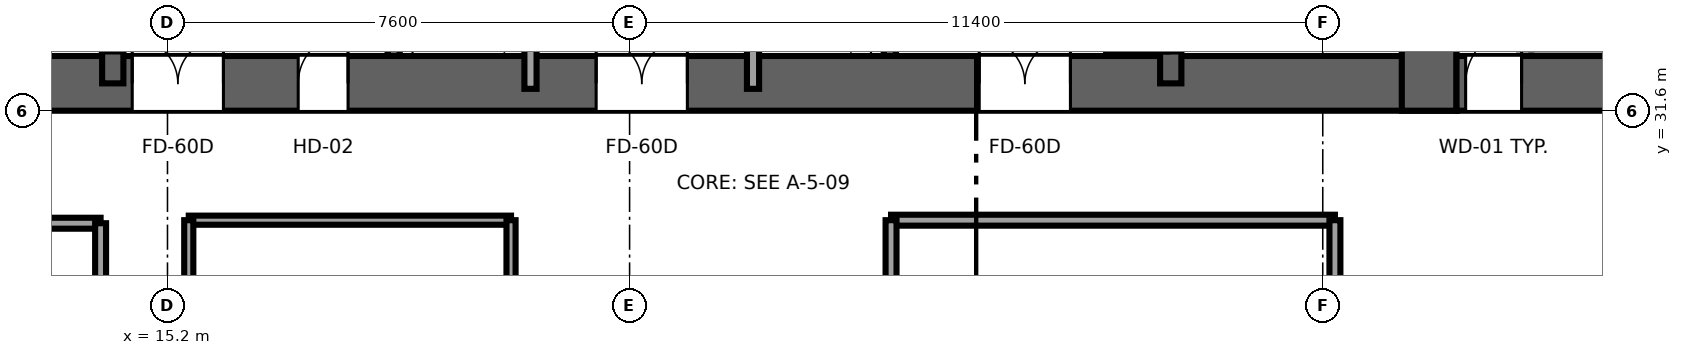
"""IFC4 building model, lengths in metres.
Left out: names, types, materials, properties, quantities, classifications, styles, units other than length and angle.
Written with IfcOpenShell. Run it as: python <this file> out.ifc"""

import sys

from ifc_helpers import new_model, si_unit, direction, frame, frame_2d, origin, place, context, subcontext, project, spatial, rectangle, extrude, source, transform, mapped, element, fill, save


model = new_model("IFC4")
c1 = context("Model", 3, precision=1e-05, world=origin(), true_north=direction((0.0, 1.0)))
c2 = subcontext(c1, "Body", "Model", "MODEL_VIEW")
j1 = project(units=[si_unit("LENGTHUNIT", "METRE"), si_unit("PLANEANGLEUNIT", "RADIAN")], contexts=[c1])
p1 = place(None, origin())
s1 = spatial("IfcSite", under=j1, at=p1, CompositionType="ELEMENT")
p2 = place(p1, origin())
s2 = spatial("IfcBuilding", under=s1, at=p2, CompositionType="ELEMENT")
p3 = place(p2, frame((0.0, 0.0, 46.2)))
s3 = spatial("IfcBuildingStorey", under=s2, at=p3, CompositionType="ELEMENT", Elevation=46.2)
p4 = place(p3, frame((9.6, 32.05, 0.0), z_axis=(0.0, 0.0, 1.0), x_axis=(1.0, 0.0, 0.0)))
e1 = element("IfcWall", 1, at=p4, inside=s3, PredefinedType="SHEAR", context=c2, shape_type="SweptSolid", body=[
    extrude(rectangle(XDim=26.8, YDim=0.9, at=frame_2d((13.4, 0.0))), origin(), (0.0, 0.0, 1.0), 3.55),
])
p5 = place(p4, frame((6.52, 0.0, 0.0), z_axis=(0.0, 0.0, 1.0), x_axis=(-1.0, 0.0, 0.0)))
e2 = element("IfcOpeningElement", 2, at=p5, cuts=e1, PredefinedType="OPENING", context=c2, shape_type="SweptSolid", body=[
    extrude(rectangle(XDim=1.5, YDim=2.04, at=frame_2d((0.75, 1.02))), frame((0.0, 0.46, 0.0), z_axis=(0.0, -1.0, 0.0), x_axis=(1.0, 0.0, 0.0)), (0.0, 0.0, 1.0), 0.92),
])
p6 = place(p4, frame((14.15, 0.0, 0.0), z_axis=(0.0, 0.0, 1.0), x_axis=(-1.0, 0.0, 0.0)))
e3 = element("IfcOpeningElement", 3, at=p6, cuts=e1, PredefinedType="OPENING", context=c2, shape_type="SweptSolid", body=[
    extrude(rectangle(XDim=1.5, YDim=2.04, at=frame_2d((0.75, 1.02))), frame((0.0, 0.46, 0.0), z_axis=(0.0, -1.0, 0.0), x_axis=(1.0, 0.0, 0.0)), (0.0, 0.0, 1.0), 0.92),
])
p7 = place(p4, frame((20.45, 0.0, 0.0), z_axis=(0.0, 0.0, 1.0), x_axis=(-1.0, 0.0, 0.0)))
e4 = element("IfcOpeningElement", 4, at=p7, cuts=e1, PredefinedType="OPENING", context=c2, shape_type="SweptSolid", body=[
    extrude(rectangle(XDim=1.5, YDim=2.04, at=frame_2d((0.75, 1.02))), frame((0.0, 0.46, 0.0), z_axis=(0.0, -1.0, 0.0), x_axis=(1.0, 0.0, 0.0)), (0.0, 0.0, 1.0), 0.92),
])
p8 = place(p4, frame((8.57, 0.0, 0.0), z_axis=(0.0, 0.0, 1.0), x_axis=(-1.0, 0.0, 0.0)))
e5 = element("IfcOpeningElement", 5, at=p8, cuts=e1, PredefinedType="OPENING", context=c2, shape_type="SweptSolid", body=[
    extrude(rectangle(XDim=0.82, YDim=2.01, at=frame_2d((0.41, 1.005))), frame((0.0, 0.46, 0.0), z_axis=(0.0, -1.0, 0.0), x_axis=(1.0, 0.0, 0.0)), (0.0, 0.0, 1.0), 0.92),
])
p9 = place(p3, frame((35.95, 31.6, 0.0), z_axis=(0.0, 0.0, 1.0), x_axis=(0.0, 1.0, 0.0)))
e6 = element("IfcWall", 6, at=p9, inside=s3, PredefinedType="SHEAR", context=c2, shape_type="SweptSolid", body=[
    extrude(rectangle(XDim=13.6, YDim=0.9, at=frame_2d((6.8, 0.0))), origin(), (0.0, 0.0, 1.0), 3.55),
])
p10 = place(p3, frame((14.3, 32.05, 0.0), z_axis=(0.0, 0.0, 1.0), x_axis=(0.0, 1.0, 0.0)))
e7 = element("IfcWall", 7, at=p10, inside=s3, PredefinedType="SHEAR", context=c2, shape_type="SweptSolid", body=[
    extrude(rectangle(XDim=12.7, YDim=0.35, at=frame_2d((6.35, 0.0))), origin(), (0.0, 0.0, 1.0), 3.55),
])
p11 = place(p10, frame((0.5, 0.0, 0.0)))
e8 = element("IfcOpeningElement", 8, at=p11, cuts=e7, PredefinedType="OPENING", context=c2, shape_type="SweptSolid", body=[
    extrude(rectangle(XDim=1.1, YDim=2.12, at=frame_2d((0.55, 1.06))), frame((0.0, 0.185, 0.0), z_axis=(0.0, -1.0, 0.0), x_axis=(1.0, 0.0, 0.0)), (0.0, 0.0, 1.0), 0.37),
])
p12 = place(p3, frame((31.7, 32.05, 0.0), z_axis=(0.0, 0.0, 1.0), x_axis=(0.0, 1.0, 0.0)))
e9 = element("IfcWall", 9, at=p12, inside=s3, PredefinedType="SHEAR", context=c2, shape_type="SweptSolid", body=[
    extrude(rectangle(XDim=12.7, YDim=0.35, at=frame_2d((6.35, 0.0))), origin(), (0.0, 0.0, 1.0), 3.55),
])
p13 = place(p12, frame((1.6, 0.0, 0.0), z_axis=(0.0, 0.0, 1.0), x_axis=(-1.0, 0.0, 0.0)))
e10 = element("IfcOpeningElement", 10, at=p13, cuts=e9, PredefinedType="OPENING", context=c2, shape_type="SweptSolid", body=[
    extrude(rectangle(XDim=1.1, YDim=2.12, at=frame_2d((0.55, 1.06))), frame((0.0, 0.185, 0.0), z_axis=(0.0, -1.0, 0.0), x_axis=(1.0, 0.0, 0.0)), (0.0, 0.0, 1.0), 0.37),
])
p14 = place(p3, frame((36.4, 32.05, 0.0), z_axis=(0.0, 0.0, 1.0), x_axis=(1.0, 0.0, 0.0)))
e11 = element("IfcWall", 11, at=p14, inside=s3, PredefinedType="SHEAR", context=c2, shape_type="SweptSolid", body=[
    extrude(rectangle(XDim=4.0, YDim=0.9, at=frame_2d((2.0, 0.0))), origin(), (0.0, 0.0, 1.0), 3.55),
])
p15 = place(p14, frame((1.07, 0.0, 0.0), z_axis=(0.0, 0.0, 1.0), x_axis=(-1.0, 0.0, 0.0)))
e12 = element("IfcOpeningElement", 12, at=p15, cuts=e11, PredefinedType="OPENING", context=c2, shape_type="SweptSolid", body=[
    extrude(rectangle(XDim=0.92, YDim=2.01, at=frame_2d((0.46, 1.005))), frame((0.0, 0.46, 0.0), z_axis=(0.0, -1.0, 0.0), x_axis=(1.0, 0.0, 0.0)), (0.0, 0.0, 1.0), 0.92),
])
for number, where, z_axis, x_axis in (
    (13, (18.92, 32.504, 0.0), (0.0, 0.0, 1.0), (0.0, 1.0, 0.0)),
    (14, (27.08, 32.504, 0.0), (0.0, 0.0, 1.0), (0.0, 1.0, 0.0)),
):
    element("IfcWall", number, at=place(p3, frame(where, z_axis=z_axis, x_axis=x_axis)), inside=s3, PredefinedType="SOLIDWALL", context=c2, shape_type="SweptSolid", body=[
        extrude(rectangle(XDim=3.646, YDim=0.2, at=frame_2d((1.823, 0.0))), origin(), (0.0, 0.0, 1.0), 3.37),
    ])
for number, where, z_axis, x_axis in (
    (15, (21.17, 31.96, 0.0), (0.0, 0.0, 1.0), (0.0, 1.0, 0.0)),
    (16, (24.83, 31.96, 0.0), (0.0, 0.0, 1.0), (0.0, 1.0, 0.0)),
):
    element("IfcWall", number, at=place(p3, frame(where, z_axis=z_axis, x_axis=x_axis)), inside=s3, PredefinedType="SOLIDWALL", context=c2, shape_type="SweptSolid", body=[
        extrude(rectangle(XDim=12.58, YDim=0.2, at=frame_2d((6.29, 0.0))), origin(), (0.0, 0.0, 1.0), 3.37),
    ])
p16 = place(p3, frame((9.88, 29.75, 0.0), z_axis=(0.0, 0.0, 1.0), x_axis=(1.0, 0.0, 0.0)))
e17 = element("IfcWall", 17, at=p16, inside=s3, PredefinedType="PARTITIONING", context=c2, shape_type="SweptSolid", body=[
    extrude(rectangle(XDim=4.22, YDim=0.18, at=frame_2d((2.11, 0.0))), origin(), (0.0, 0.0, 1.0), 3.37),
])
p17 = place(p3, frame((14.1, 21.7, 0.0), z_axis=(0.0, 0.0, 1.0), x_axis=(0.0, 1.0, 0.0)))
e18 = element("IfcWall", 18, at=p17, inside=s3, PredefinedType="PARTITIONING", context=c2, shape_type="SweptSolid", body=[
    extrude(rectangle(XDim=8.05, YDim=0.18, at=frame_2d((4.025, 0.0))), origin(), (0.0, 0.0, 1.0), 3.37),
])
p18 = place(p3, frame((27.1, 29.8, 0.0), z_axis=(0.0, 0.0, 1.0), x_axis=(1.0, 0.0, 0.0)))
e19 = element("IfcWall", 19, at=p18, inside=s3, PredefinedType="PARTITIONING", context=c2, shape_type="SweptSolid", body=[
    extrude(rectangle(XDim=7.3, YDim=0.18, at=frame_2d((3.65, 0.0))), origin(), (0.0, 0.0, 1.0), 3.37),
])
for number, where, z_axis, x_axis in (
    (20, (27.1, 21.7, 0.0), (0.0, 0.0, 1.0), (0.0, 1.0, 0.0)),
    (21, (34.4, 21.7, 0.0), (0.0, 0.0, 1.0), (0.0, 1.0, 0.0)),
):
    element("IfcWall", number, at=place(p3, frame(where, z_axis=z_axis, x_axis=x_axis)), inside=s3, PredefinedType="PARTITIONING", context=c2, shape_type="SweptSolid", body=[
        extrude(rectangle(XDim=8.1, YDim=0.18, at=frame_2d((4.05, 0.0))), origin(), (0.0, 0.0, 1.0), 3.37),
    ])
p19 = place(p3, frame((15.55, 29.8, 0.0), z_axis=(0.0, 0.0, 1.0), x_axis=(1.0, 0.0, 0.0)))
e22 = element("IfcWall", 22, at=p19, inside=s3, PredefinedType="PARTITIONING", context=c2, shape_type="SweptSolid", body=[
    extrude(rectangle(XDim=5.3, YDim=0.15, at=frame_2d((2.65, 0.0))), origin(), (0.0, 0.0, 1.0), 3.37),
])
for number, where, z_axis, x_axis in (
    (23, (15.55, 21.7, 0.0), (0.0, 0.0, 1.0), (0.0, 1.0, 0.0)),
    (24, (20.85, 21.7, 0.0), (0.0, 0.0, 1.0), (0.0, 1.0, 0.0)),
):
    element("IfcWall", number, at=place(p3, frame(where, z_axis=z_axis, x_axis=x_axis)), inside=s3, PredefinedType="PARTITIONING", context=c2, shape_type="SweptSolid", body=[
        extrude(rectangle(XDim=8.1, YDim=0.15, at=frame_2d((4.05, 0.0))), origin(), (0.0, 0.0, 1.0), 3.37),
    ])
m1 = source(origin(), c2, "Body", "SweptSolid", [
    extrude(rectangle(XDim=1.1, YDim=2.12, at=frame_2d((0.55, 1.06))), frame((0.0, 0.025, 0.0), z_axis=(0.0, -1.0, 0.0), x_axis=(1.0, 0.0, 0.0)), (0.0, 0.0, 1.0), 0.05),
])
p20 = place(p11, origin())
e25 = element("IfcDoor", 25, at=p20, inside=s3, OperationType="SINGLE_SWING_RIGHT", PredefinedType="DOOR", context=c2, shape_type="MappedRepresentation", body=[
    mapped(m1, transform((0.0, 0.0, 0.0), x_axis=(1.0, 0.0, 0.0), y_axis=(0.0, 1.0, 0.0), z_axis=(0.0, 0.0, 1.0), scale=1.0)),
])
fill(e8, e25)
p21 = place(p13, origin())
e26 = element("IfcDoor", 26, at=p21, inside=s3, OperationType="SINGLE_SWING_LEFT", PredefinedType="DOOR", context=c2, shape_type="MappedRepresentation", body=[
    mapped(m1, transform((0.0, 0.0, 0.0), x_axis=(1.0, 0.0, 0.0), y_axis=(0.0, 1.0, 0.0), z_axis=(0.0, 0.0, 1.0), scale=1.0)),
])
fill(e10, e26)
m2 = source(origin(), c2, "Body", "SweptSolid", [
    extrude(rectangle(XDim=1.5, YDim=2.04, at=frame_2d((0.75, 1.02))), frame((0.0, 0.025, 0.0), z_axis=(0.0, -1.0, 0.0), x_axis=(1.0, 0.0, 0.0)), (0.0, 0.0, 1.0), 0.05),
])
p22 = place(p5, origin())
e27 = element("IfcDoor", 27, at=p22, inside=s3, OperationType="DOUBLE_DOOR_SINGLE_SWING", PredefinedType="DOOR", context=c2, shape_type="MappedRepresentation", body=[
    mapped(m2, transform((0.0, 0.0, 0.0), x_axis=(1.0, 0.0, 0.0), y_axis=(0.0, 1.0, 0.0), z_axis=(0.0, 0.0, 1.0), scale=1.0)),
])
fill(e2, e27)
p23 = place(p6, origin())
e28 = element("IfcDoor", 28, at=p23, inside=s3, OperationType="DOUBLE_DOOR_SINGLE_SWING", PredefinedType="DOOR", context=c2, shape_type="MappedRepresentation", body=[
    mapped(m2, transform((0.0, 0.0, 0.0), x_axis=(1.0, 0.0, 0.0), y_axis=(0.0, 1.0, 0.0), z_axis=(0.0, 0.0, 1.0), scale=1.0)),
])
fill(e3, e28)
p24 = place(p7, origin())
e29 = element("IfcDoor", 29, at=p24, inside=s3, OperationType="DOUBLE_DOOR_SINGLE_SWING", PredefinedType="DOOR", context=c2, shape_type="MappedRepresentation", body=[
    mapped(m2, transform((0.0, 0.0, 0.0), x_axis=(1.0, 0.0, 0.0), y_axis=(0.0, 1.0, 0.0), z_axis=(0.0, 0.0, 1.0), scale=1.0)),
])
fill(e4, e29)
m3 = source(origin(), c2, "Body", "SweptSolid", [
    extrude(rectangle(XDim=0.82, YDim=2.01, at=frame_2d((0.41, 1.005))), frame((0.0, 0.025, 0.0), z_axis=(0.0, -1.0, 0.0), x_axis=(1.0, 0.0, 0.0)), (0.0, 0.0, 1.0), 0.05),
])
p25 = place(p8, origin())
e30 = element("IfcDoor", 30, at=p25, inside=s3, OperationType="SINGLE_SWING_RIGHT", PredefinedType="DOOR", context=c2, shape_type="MappedRepresentation", body=[
    mapped(m3, transform((0.0, 0.0, 0.0), x_axis=(1.0, 0.0, 0.0), y_axis=(0.0, 1.0, 0.0), z_axis=(0.0, 0.0, 1.0), scale=1.0)),
])
fill(e5, e30)
m4 = source(origin(), c2, "Body", "SweptSolid", [
    extrude(rectangle(XDim=0.92, YDim=2.01, at=frame_2d((0.46, 1.005))), frame((0.0, 0.025, 0.0), z_axis=(0.0, -1.0, 0.0), x_axis=(1.0, 0.0, 0.0)), (0.0, 0.0, 1.0), 0.05),
])
p26 = place(p15, origin())
e31 = element("IfcDoor", 31, at=p26, inside=s3, OperationType="SINGLE_SWING_RIGHT", PredefinedType="DOOR", context=c2, shape_type="MappedRepresentation", body=[
    mapped(m4, transform((0.0, 0.0, 0.0), x_axis=(1.0, 0.0, 0.0), y_axis=(0.0, 1.0, 0.0), z_axis=(0.0, 0.0, 1.0), scale=1.0)),
])
fill(e12, e31)
save(model, sys.argv[1])
